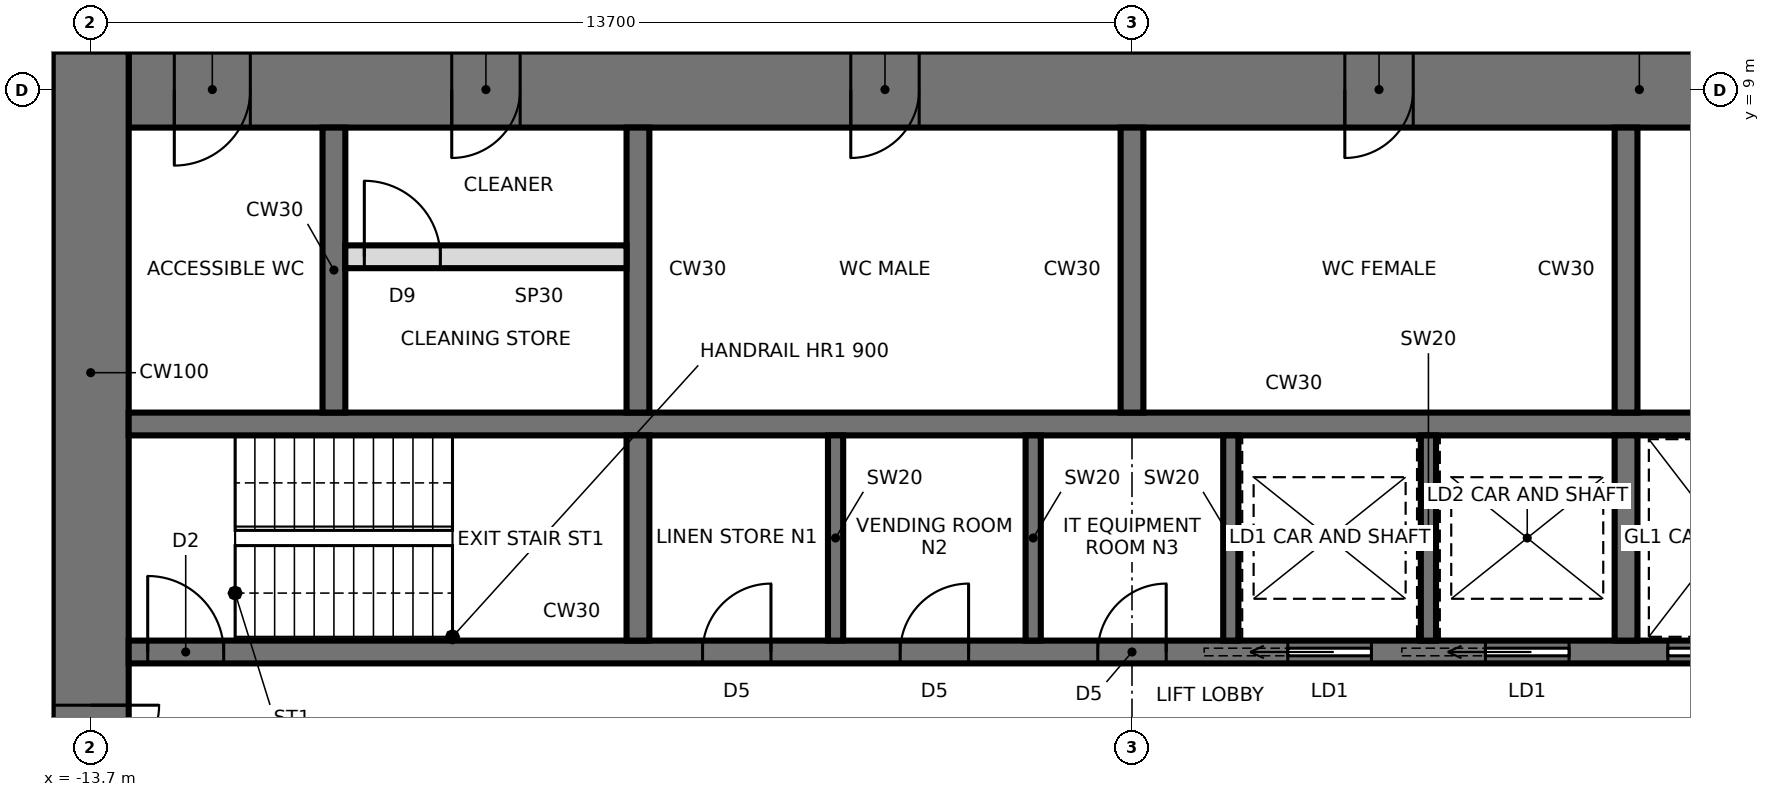
"""IFC4 building model, lengths in metres.
Left out: names, types, materials, properties, quantities, classifications, styles, units other than length and angle.
Written with IfcOpenShell. Run it as: python <this file> out.ifc"""

import sys

from ifc_helpers import new_model, si_unit, direction, frame, frame_2d, origin, place, context, subcontext, project, spatial, rectangle, extrude, element, fill, save


model = new_model("IFC4")
c1 = context("Model", 3, precision=1e-05, world=origin(), true_north=direction((0.0, 1.0)))
c2 = subcontext(c1, "Body", "Model", "MODEL_VIEW")
j1 = project(units=[si_unit("LENGTHUNIT", "METRE"), si_unit("PLANEANGLEUNIT", "RADIAN")], contexts=[c1])
p1 = place(None, origin())
s1 = spatial("IfcSite", under=j1, at=p1, CompositionType="ELEMENT")
p2 = place(p1, origin())
s2 = spatial("IfcBuilding", under=s1, at=p2, CompositionType="ELEMENT")
p3 = place(p2, frame((0.0, 0.0, 272.8)))
s3 = spatial("IfcBuildingStorey", under=s2, at=p3, CompositionType="ELEMENT", Elevation=272.8)
p4 = place(p3, frame((13.2, 9.0, 0.0), z_axis=(0.0, 0.0, 1.0), x_axis=(-1.0, 0.0, 0.0)))
e1 = element("IfcWall", 1, at=p4, inside=s3, PredefinedType="SHEAR", context=c2, shape_type="SweptSolid", body=[
    extrude(rectangle(XDim=26.4, YDim=1.0, at=frame_2d((13.2, 0.0))), origin(), (0.0, 0.0, 1.0), 4.2),
])
p5 = place(p4, frame((2.65, 0.0, 0.0)))
e2 = element("IfcOpeningElement", 2, at=p5, cuts=e1, PredefinedType="OPENING", context=c2, shape_type="SweptSolid", body=[
    extrude(rectangle(XDim=0.9, YDim=2.1, at=frame_2d((0.45, 1.05))), frame((0.0, 0.51, 0.0), z_axis=(0.0, -1.0, 0.0), x_axis=(1.0, 0.0, 0.0)), (0.0, 0.0, 1.0), 1.02),
])
p6 = place(p4, frame((9.5, 0.0, 0.0)))
e3 = element("IfcOpeningElement", 3, at=p6, cuts=e1, PredefinedType="OPENING", context=c2, shape_type="SweptSolid", body=[
    extrude(rectangle(XDim=0.9, YDim=2.1, at=frame_2d((0.45, 1.05))), frame((0.0, 0.51, 0.0), z_axis=(0.0, -1.0, 0.0), x_axis=(1.0, 0.0, 0.0)), (0.0, 0.0, 1.0), 1.02),
])
p7 = place(p4, frame((16.0, 0.0, 0.0)))
e4 = element("IfcOpeningElement", 4, at=p7, cuts=e1, PredefinedType="OPENING", context=c2, shape_type="SweptSolid", body=[
    extrude(rectangle(XDim=0.9, YDim=2.1, at=frame_2d((0.45, 1.05))), frame((0.0, 0.51, 0.0), z_axis=(0.0, -1.0, 0.0), x_axis=(1.0, 0.0, 0.0)), (0.0, 0.0, 1.0), 1.02),
])
p8 = place(p4, frame((21.25, 0.0, 0.0)))
e5 = element("IfcOpeningElement", 5, at=p8, cuts=e1, PredefinedType="OPENING", context=c2, shape_type="SweptSolid", body=[
    extrude(rectangle(XDim=0.9, YDim=2.1, at=frame_2d((0.45, 1.05))), frame((0.0, 0.51, 0.0), z_axis=(0.0, -1.0, 0.0), x_axis=(1.0, 0.0, 0.0)), (0.0, 0.0, 1.0), 1.02),
])
p9 = place(p4, frame((24.8, 0.0, 0.0)))
e6 = element("IfcOpeningElement", 6, at=p9, cuts=e1, PredefinedType="OPENING", context=c2, shape_type="SweptSolid", body=[
    extrude(rectangle(XDim=1.0, YDim=2.1, at=frame_2d((0.5, 1.05))), frame((0.0, 0.51, 0.0), z_axis=(0.0, -1.0, 0.0), x_axis=(1.0, 0.0, 0.0)), (0.0, 0.0, 1.0), 1.02),
])
p10 = place(p3, frame((-13.7, 9.5, 0.0), z_axis=(0.0, 0.0, 1.0), x_axis=(0.0, -1.0, 0.0)))
e7 = element("IfcWall", 7, at=p10, inside=s3, PredefinedType="SHEAR", context=c2, shape_type="SweptSolid", body=[
    extrude(rectangle(XDim=19.0, YDim=1.0, at=frame_2d((9.5, 0.0))), origin(), (0.0, 0.0, 1.0), 4.2),
])
p11 = place(p10, frame((8.6, 0.0, 0.0)))
e8 = element("IfcOpeningElement", 8, at=p11, cuts=e7, PredefinedType="OPENING", context=c2, shape_type="SweptSolid", body=[
    extrude(rectangle(XDim=1.8, YDim=2.4, at=frame_2d((0.9, 1.2))), frame((0.0, 0.51, 0.0), z_axis=(0.0, -1.0, 0.0), x_axis=(1.0, 0.0, 0.0)), (0.0, 0.0, 1.0), 1.02),
])
p12 = place(p3, frame((-13.2, 1.6, 0.0), z_axis=(0.0, 0.0, 1.0), x_axis=(1.0, 0.0, 0.0)))
e9 = element("IfcWall", 9, at=p12, inside=s3, PredefinedType="SHEAR", context=c2, shape_type="SweptSolid", body=[
    extrude(rectangle(XDim=26.4, YDim=0.3, at=frame_2d((13.2, 0.0))), origin(), (0.0, 0.0, 1.0), 4.2),
])
p13 = place(p12, frame((0.25, 0.0, 0.0)))
e10 = element("IfcOpeningElement", 10, at=p13, cuts=e9, PredefinedType="OPENING", context=c2, shape_type="SweptSolid", body=[
    extrude(rectangle(XDim=1.0, YDim=2.1, at=frame_2d((0.5, 1.05))), frame((0.0, 0.16, 0.0), z_axis=(0.0, -1.0, 0.0), x_axis=(1.0, 0.0, 0.0)), (0.0, 0.0, 1.0), 0.32),
])
p14 = place(p12, frame((20.25, 0.0, 0.0)))
e11 = element("IfcOpeningElement", 11, at=p14, cuts=e9, PredefinedType="OPENING", context=c2, shape_type="SweptSolid", body=[
    extrude(rectangle(XDim=1.5, YDim=2.4, at=frame_2d((0.75, 1.2))), frame((0.0, 0.16, 0.0), z_axis=(0.0, -1.0, 0.0), x_axis=(1.0, 0.0, 0.0)), (0.0, 0.0, 1.0), 0.32),
])
p15 = place(p12, frame((7.55, 0.0, 0.0)))
e12 = element("IfcOpeningElement", 12, at=p15, cuts=e9, PredefinedType="OPENING", context=c2, shape_type="SweptSolid", body=[
    extrude(rectangle(XDim=0.9, YDim=2.1, at=frame_2d((0.45, 1.05))), frame((0.0, 0.16, 0.0), z_axis=(0.0, -1.0, 0.0), x_axis=(1.0, 0.0, 0.0)), (0.0, 0.0, 1.0), 0.32),
])
p16 = place(p12, frame((10.15, 0.0, 0.0)))
e13 = element("IfcOpeningElement", 13, at=p16, cuts=e9, PredefinedType="OPENING", context=c2, shape_type="SweptSolid", body=[
    extrude(rectangle(XDim=0.9, YDim=2.1, at=frame_2d((0.45, 1.05))), frame((0.0, 0.16, 0.0), z_axis=(0.0, -1.0, 0.0), x_axis=(1.0, 0.0, 0.0)), (0.0, 0.0, 1.0), 0.32),
])
p17 = place(p12, frame((12.75, 0.0, 0.0)))
e14 = element("IfcOpeningElement", 14, at=p17, cuts=e9, PredefinedType="OPENING", context=c2, shape_type="SweptSolid", body=[
    extrude(rectangle(XDim=0.9, YDim=2.1, at=frame_2d((0.45, 1.05))), frame((0.0, 0.16, 0.0), z_axis=(0.0, -1.0, 0.0), x_axis=(1.0, 0.0, 0.0)), (0.0, 0.0, 1.0), 0.32),
])
p18 = place(p12, frame((15.25, 0.0, 0.0)))
e15 = element("IfcOpeningElement", 15, at=p18, cuts=e9, PredefinedType="OPENING", context=c2, shape_type="SweptSolid", body=[
    extrude(rectangle(XDim=1.1, YDim=2.3, at=frame_2d((0.55, 1.15))), frame((0.0, 0.16, 0.0), z_axis=(0.0, -1.0, 0.0), x_axis=(1.0, 0.0, 0.0)), (0.0, 0.0, 1.0), 0.32),
])
p19 = place(p12, frame((17.85, 0.0, 0.0)))
e16 = element("IfcOpeningElement", 16, at=p19, cuts=e9, PredefinedType="OPENING", context=c2, shape_type="SweptSolid", body=[
    extrude(rectangle(XDim=1.1, YDim=2.3, at=frame_2d((0.55, 1.15))), frame((0.0, 0.16, 0.0), z_axis=(0.0, -1.0, 0.0), x_axis=(1.0, 0.0, 0.0)), (0.0, 0.0, 1.0), 0.32),
])
p20 = place(p12, frame((24.15, 0.0, 0.0)))
e17 = element("IfcOpeningElement", 17, at=p20, cuts=e9, PredefinedType="OPENING", context=c2, shape_type="SweptSolid", body=[
    extrude(rectangle(XDim=0.9, YDim=2.1, at=frame_2d((0.45, 1.05))), frame((0.0, 0.16, 0.0), z_axis=(0.0, -1.0, 0.0), x_axis=(1.0, 0.0, 0.0)), (0.0, 0.0, 1.0), 0.32),
])
p21 = place(p3, frame((-13.2, 4.6, 0.0), z_axis=(0.0, 0.0, 1.0), x_axis=(1.0, 0.0, 0.0)))
e18 = element("IfcWall", 18, at=p21, inside=s3, PredefinedType="SHEAR", context=c2, shape_type="SweptSolid", body=[
    extrude(rectangle(XDim=26.4, YDim=0.3, at=frame_2d((13.2, 0.0))), origin(), (0.0, 0.0, 1.0), 4.2),
])
p22 = place(p3, frame((-6.5, 1.75, 0.0), z_axis=(0.0, 0.0, 1.0), x_axis=(0.0, 1.0, 0.0)))
e19 = element("IfcWall", 19, at=p22, inside=s3, PredefinedType="SHEAR", context=c2, shape_type="SweptSolid", body=[
    extrude(rectangle(XDim=2.7, YDim=0.3, at=frame_2d((1.35, 0.0))), origin(), (0.0, 0.0, 1.0), 4.2),
])
p23 = place(p3, frame((-6.5, 4.75, 0.0), z_axis=(0.0, 0.0, 1.0), x_axis=(0.0, 1.0, 0.0)))
e20 = element("IfcWall", 20, at=p23, inside=s3, PredefinedType="SHEAR", context=c2, shape_type="SweptSolid", body=[
    extrude(rectangle(XDim=3.75, YDim=0.3, at=frame_2d((1.875, 0.0))), origin(), (0.0, 0.0, 1.0), 4.2),
])
p24 = place(p3, frame((6.5, 1.75, 0.0), z_axis=(0.0, 0.0, 1.0), x_axis=(0.0, 1.0, 0.0)))
e21 = element("IfcWall", 21, at=p24, inside=s3, PredefinedType="SHEAR", context=c2, shape_type="SweptSolid", body=[
    extrude(rectangle(XDim=2.7, YDim=0.3, at=frame_2d((1.35, 0.0))), origin(), (0.0, 0.0, 1.0), 4.2),
])
p25 = place(p3, frame((6.5, 4.75, 0.0), z_axis=(0.0, 0.0, 1.0), x_axis=(0.0, 1.0, 0.0)))
e22 = element("IfcWall", 22, at=p25, inside=s3, PredefinedType="SHEAR", context=c2, shape_type="SweptSolid", body=[
    extrude(rectangle(XDim=3.75, YDim=0.3, at=frame_2d((1.875, 0.0))), origin(), (0.0, 0.0, 1.0), 4.2),
])
for number, where, z_axis, x_axis in (
    (23, (-3.9, 1.75, 0.0), (0.0, 0.0, 1.0), (0.0, 1.0, 0.0)),
    (24, (-1.3, 1.75, 0.0), (0.0, 0.0, 1.0), (0.0, 1.0, 0.0)),
    (25, (1.3, 1.75, 0.0), (0.0, 0.0, 1.0), (0.0, 1.0, 0.0)),
    (26, (3.9, 1.75, 0.0), (0.0, 0.0, 1.0), (0.0, 1.0, 0.0)),
):
    element("IfcWall", number, at=place(p3, frame(where, z_axis=z_axis, x_axis=x_axis)), inside=s3, PredefinedType="SHEAR", context=c2, shape_type="SweptSolid", body=[
        extrude(rectangle(XDim=2.7, YDim=0.2, at=frame_2d((1.35, 0.0))), origin(), (0.0, 0.0, 1.0), 4.2),
    ])
for number, where, z_axis, x_axis in (
    (27, (0.0, 4.75, 0.0), (0.0, 0.0, 1.0), (0.0, 1.0, 0.0)),
    (28, (-10.5, 4.75, 0.0), (0.0, 0.0, 1.0), (0.0, 1.0, 0.0)),
):
    element("IfcWall", number, at=place(p3, frame(where, z_axis=z_axis, x_axis=x_axis)), inside=s3, PredefinedType="SHEAR", context=c2, shape_type="SweptSolid", body=[
        extrude(rectangle(XDim=3.75, YDim=0.3, at=frame_2d((1.875, 0.0))), origin(), (0.0, 0.0, 1.0), 4.2),
    ])
p26 = place(p3, frame((-10.35, 6.8, 0.0), z_axis=(0.0, 0.0, 1.0), x_axis=(1.0, 0.0, 0.0)))
e29 = element("IfcWall", 29, at=p26, inside=s3, PredefinedType="PARTITIONING", context=c2, shape_type="SweptSolid", body=[
    extrude(rectangle(XDim=3.7, YDim=0.3, at=frame_2d((1.85, 0.0))), origin(), (0.0, 0.0, 1.0), 4.0),
])
p27 = place(p26, frame((0.25, 0.0, 0.0)))
e30 = element("IfcOpeningElement", 30, at=p27, cuts=e29, PredefinedType="OPENING", context=c2, shape_type="SweptSolid", body=[
    extrude(rectangle(XDim=1.0, YDim=2.4, at=frame_2d((0.5, 1.2))), frame((0.0, 0.16, 0.0), z_axis=(0.0, -1.0, 0.0), x_axis=(1.0, 0.0, 0.0)), (0.0, 0.0, 1.0), 0.32),
])
p28 = place(p11, origin())
e31 = element("IfcDoor", 31, at=p28, inside=s3, OperationType="DOUBLE_DOOR_SINGLE_SWING", PredefinedType="DOOR", context=c2, shape_type="SweptSolid", body=[
    extrude(rectangle(XDim=1.72, YDim=2.36, at=frame_2d((0.9, 1.18))), frame((0.0, 0.025, 0.0), z_axis=(0.0, -1.0, 0.0), x_axis=(1.0, 0.0, 0.0)), (0.0, 0.0, 1.0), 0.05),
    extrude(rectangle(XDim=0.04, YDim=2.4, at=frame_2d((0.02, 1.2))), frame((0.0, 0.25, 0.0), z_axis=(0.0, -1.0, 0.0), x_axis=(1.0, 0.0, 0.0)), (0.0, 0.0, 1.0), 0.5),
    extrude(rectangle(XDim=0.04, YDim=2.4, at=frame_2d((1.78, 1.2))), frame((0.0, 0.25, 0.0), z_axis=(0.0, -1.0, 0.0), x_axis=(1.0, 0.0, 0.0)), (0.0, 0.0, 1.0), 0.5),
    extrude(rectangle(XDim=1.72, YDim=0.04, at=frame_2d((0.9, 2.38))), frame((0.0, 0.25, 0.0), z_axis=(0.0, -1.0, 0.0), x_axis=(1.0, 0.0, 0.0)), (0.0, 0.0, 1.0), 0.5),
])
fill(e8, e31)
p29 = place(p13, origin())
e32 = element("IfcDoor", 32, at=p29, inside=s3, OperationType="SINGLE_SWING_LEFT", PredefinedType="DOOR", context=c2, shape_type="SweptSolid", body=[
    extrude(rectangle(XDim=1.0, YDim=2.1, at=frame_2d((0.5, 1.05))), frame((0.0, 0.025, 0.0), z_axis=(0.0, -1.0, 0.0), x_axis=(1.0, 0.0, 0.0)), (0.0, 0.0, 1.0), 0.05),
])
fill(e10, e32)
p30 = place(p14, origin())
e33 = element("IfcDoor", 33, at=p30, inside=s3, OperationType="SLIDING_TO_RIGHT", PredefinedType="DOOR", context=c2, shape_type="SweptSolid", body=[
    extrude(rectangle(XDim=1.5, YDim=2.4, at=frame_2d((0.75, 1.2))), frame((0.0, 0.025, 0.0), z_axis=(0.0, -1.0, 0.0), x_axis=(1.0, 0.0, 0.0)), (0.0, 0.0, 1.0), 0.05),
])
fill(e11, e33)
p31 = place(p15, origin())
e34 = element("IfcDoor", 34, at=p31, inside=s3, OperationType="SINGLE_SWING_RIGHT", PredefinedType="DOOR", context=c2, shape_type="SweptSolid", body=[
    extrude(rectangle(XDim=0.9, YDim=2.1, at=frame_2d((0.45, 1.05))), frame((0.0, 0.025, 0.0), z_axis=(0.0, -1.0, 0.0), x_axis=(1.0, 0.0, 0.0)), (0.0, 0.0, 1.0), 0.05),
])
fill(e12, e34)
p32 = place(p16, origin())
e35 = element("IfcDoor", 35, at=p32, inside=s3, OperationType="SINGLE_SWING_RIGHT", PredefinedType="DOOR", context=c2, shape_type="SweptSolid", body=[
    extrude(rectangle(XDim=0.9, YDim=2.1, at=frame_2d((0.45, 1.05))), frame((0.0, 0.025, 0.0), z_axis=(0.0, -1.0, 0.0), x_axis=(1.0, 0.0, 0.0)), (0.0, 0.0, 1.0), 0.05),
])
fill(e13, e35)
p33 = place(p17, origin())
e36 = element("IfcDoor", 36, at=p33, inside=s3, OperationType="SINGLE_SWING_RIGHT", PredefinedType="DOOR", context=c2, shape_type="SweptSolid", body=[
    extrude(rectangle(XDim=0.9, YDim=2.1, at=frame_2d((0.45, 1.05))), frame((0.0, 0.025, 0.0), z_axis=(0.0, -1.0, 0.0), x_axis=(1.0, 0.0, 0.0)), (0.0, 0.0, 1.0), 0.05),
])
fill(e14, e36)
p34 = place(p18, origin())
e37 = element("IfcDoor", 37, at=p34, inside=s3, OperationType="SLIDING_TO_LEFT", PredefinedType="DOOR", context=c2, shape_type="SweptSolid", body=[
    extrude(rectangle(XDim=1.1, YDim=2.3, at=frame_2d((0.55, 1.15))), frame((0.0, 0.025, 0.0), z_axis=(0.0, -1.0, 0.0), x_axis=(1.0, 0.0, 0.0)), (0.0, 0.0, 1.0), 0.05),
])
fill(e15, e37)
p35 = place(p19, origin())
e38 = element("IfcDoor", 38, at=p35, inside=s3, OperationType="SLIDING_TO_LEFT", PredefinedType="DOOR", context=c2, shape_type="SweptSolid", body=[
    extrude(rectangle(XDim=1.1, YDim=2.3, at=frame_2d((0.55, 1.15))), frame((0.0, 0.025, 0.0), z_axis=(0.0, -1.0, 0.0), x_axis=(1.0, 0.0, 0.0)), (0.0, 0.0, 1.0), 0.05),
])
fill(e16, e38)
p36 = place(p6, origin())
e39 = element("IfcDoor", 39, at=p36, inside=s3, OperationType="SINGLE_SWING_RIGHT", PredefinedType="DOOR", context=c2, shape_type="SweptSolid", body=[
    extrude(rectangle(XDim=0.82, YDim=2.06, at=frame_2d((0.45, 1.03))), frame((0.0, 0.025, 0.0), z_axis=(0.0, -1.0, 0.0), x_axis=(1.0, 0.0, 0.0)), (0.0, 0.0, 1.0), 0.05),
    extrude(rectangle(XDim=0.04, YDim=2.1, at=frame_2d((0.02, 1.05))), frame((0.0, 0.25, 0.0), z_axis=(0.0, -1.0, 0.0), x_axis=(1.0, 0.0, 0.0)), (0.0, 0.0, 1.0), 0.5),
    extrude(rectangle(XDim=0.04, YDim=2.1, at=frame_2d((0.88, 1.05))), frame((0.0, 0.25, 0.0), z_axis=(0.0, -1.0, 0.0), x_axis=(1.0, 0.0, 0.0)), (0.0, 0.0, 1.0), 0.5),
    extrude(rectangle(XDim=0.82, YDim=0.04, at=frame_2d((0.45, 2.08))), frame((0.0, 0.25, 0.0), z_axis=(0.0, -1.0, 0.0), x_axis=(1.0, 0.0, 0.0)), (0.0, 0.0, 1.0), 0.5),
])
fill(e3, e39)
p37 = place(p7, origin())
e40 = element("IfcDoor", 40, at=p37, inside=s3, OperationType="SINGLE_SWING_RIGHT", PredefinedType="DOOR", context=c2, shape_type="SweptSolid", body=[
    extrude(rectangle(XDim=0.82, YDim=2.06, at=frame_2d((0.45, 1.03))), frame((0.0, 0.025, 0.0), z_axis=(0.0, -1.0, 0.0), x_axis=(1.0, 0.0, 0.0)), (0.0, 0.0, 1.0), 0.05),
    extrude(rectangle(XDim=0.04, YDim=2.1, at=frame_2d((0.02, 1.05))), frame((0.0, 0.25, 0.0), z_axis=(0.0, -1.0, 0.0), x_axis=(1.0, 0.0, 0.0)), (0.0, 0.0, 1.0), 0.5),
    extrude(rectangle(XDim=0.04, YDim=2.1, at=frame_2d((0.88, 1.05))), frame((0.0, 0.25, 0.0), z_axis=(0.0, -1.0, 0.0), x_axis=(1.0, 0.0, 0.0)), (0.0, 0.0, 1.0), 0.5),
    extrude(rectangle(XDim=0.82, YDim=0.04, at=frame_2d((0.45, 2.08))), frame((0.0, 0.25, 0.0), z_axis=(0.0, -1.0, 0.0), x_axis=(1.0, 0.0, 0.0)), (0.0, 0.0, 1.0), 0.5),
])
fill(e4, e40)
p38 = place(p8, origin())
e41 = element("IfcDoor", 41, at=p38, inside=s3, OperationType="SINGLE_SWING_RIGHT", PredefinedType="DOOR", context=c2, shape_type="SweptSolid", body=[
    extrude(rectangle(XDim=0.82, YDim=2.06, at=frame_2d((0.45, 1.03))), frame((0.0, 0.025, 0.0), z_axis=(0.0, -1.0, 0.0), x_axis=(1.0, 0.0, 0.0)), (0.0, 0.0, 1.0), 0.05),
    extrude(rectangle(XDim=0.04, YDim=2.1, at=frame_2d((0.02, 1.05))), frame((0.0, 0.25, 0.0), z_axis=(0.0, -1.0, 0.0), x_axis=(1.0, 0.0, 0.0)), (0.0, 0.0, 1.0), 0.5),
    extrude(rectangle(XDim=0.04, YDim=2.1, at=frame_2d((0.88, 1.05))), frame((0.0, 0.25, 0.0), z_axis=(0.0, -1.0, 0.0), x_axis=(1.0, 0.0, 0.0)), (0.0, 0.0, 1.0), 0.5),
    extrude(rectangle(XDim=0.82, YDim=0.04, at=frame_2d((0.45, 2.08))), frame((0.0, 0.25, 0.0), z_axis=(0.0, -1.0, 0.0), x_axis=(1.0, 0.0, 0.0)), (0.0, 0.0, 1.0), 0.5),
])
fill(e5, e41)
p39 = place(p9, origin())
e42 = element("IfcDoor", 42, at=p39, inside=s3, OperationType="SINGLE_SWING_RIGHT", PredefinedType="DOOR", context=c2, shape_type="SweptSolid", body=[
    extrude(rectangle(XDim=0.92, YDim=2.06, at=frame_2d((0.5, 1.03))), frame((0.0, 0.025, 0.0), z_axis=(0.0, -1.0, 0.0), x_axis=(1.0, 0.0, 0.0)), (0.0, 0.0, 1.0), 0.05),
    extrude(rectangle(XDim=0.04, YDim=2.1, at=frame_2d((0.02, 1.05))), frame((0.0, 0.25, 0.0), z_axis=(0.0, -1.0, 0.0), x_axis=(1.0, 0.0, 0.0)), (0.0, 0.0, 1.0), 0.5),
    extrude(rectangle(XDim=0.04, YDim=2.1, at=frame_2d((0.98, 1.05))), frame((0.0, 0.25, 0.0), z_axis=(0.0, -1.0, 0.0), x_axis=(1.0, 0.0, 0.0)), (0.0, 0.0, 1.0), 0.5),
    extrude(rectangle(XDim=0.92, YDim=0.04, at=frame_2d((0.5, 2.08))), frame((0.0, 0.25, 0.0), z_axis=(0.0, -1.0, 0.0), x_axis=(1.0, 0.0, 0.0)), (0.0, 0.0, 1.0), 0.5),
])
fill(e6, e42)
p40 = place(p27, origin())
e43 = element("IfcDoor", 43, at=p40, inside=s3, OperationType="SINGLE_SWING_LEFT", PredefinedType="DOOR", context=c2, shape_type="SweptSolid", body=[
    extrude(rectangle(XDim=1.0, YDim=2.4, at=frame_2d((0.5, 1.2))), frame((0.0, 0.025, 0.0), z_axis=(0.0, -1.0, 0.0), x_axis=(1.0, 0.0, 0.0)), (0.0, 0.0, 1.0), 0.05),
])
fill(e30, e43)
save(model, sys.argv[1])
